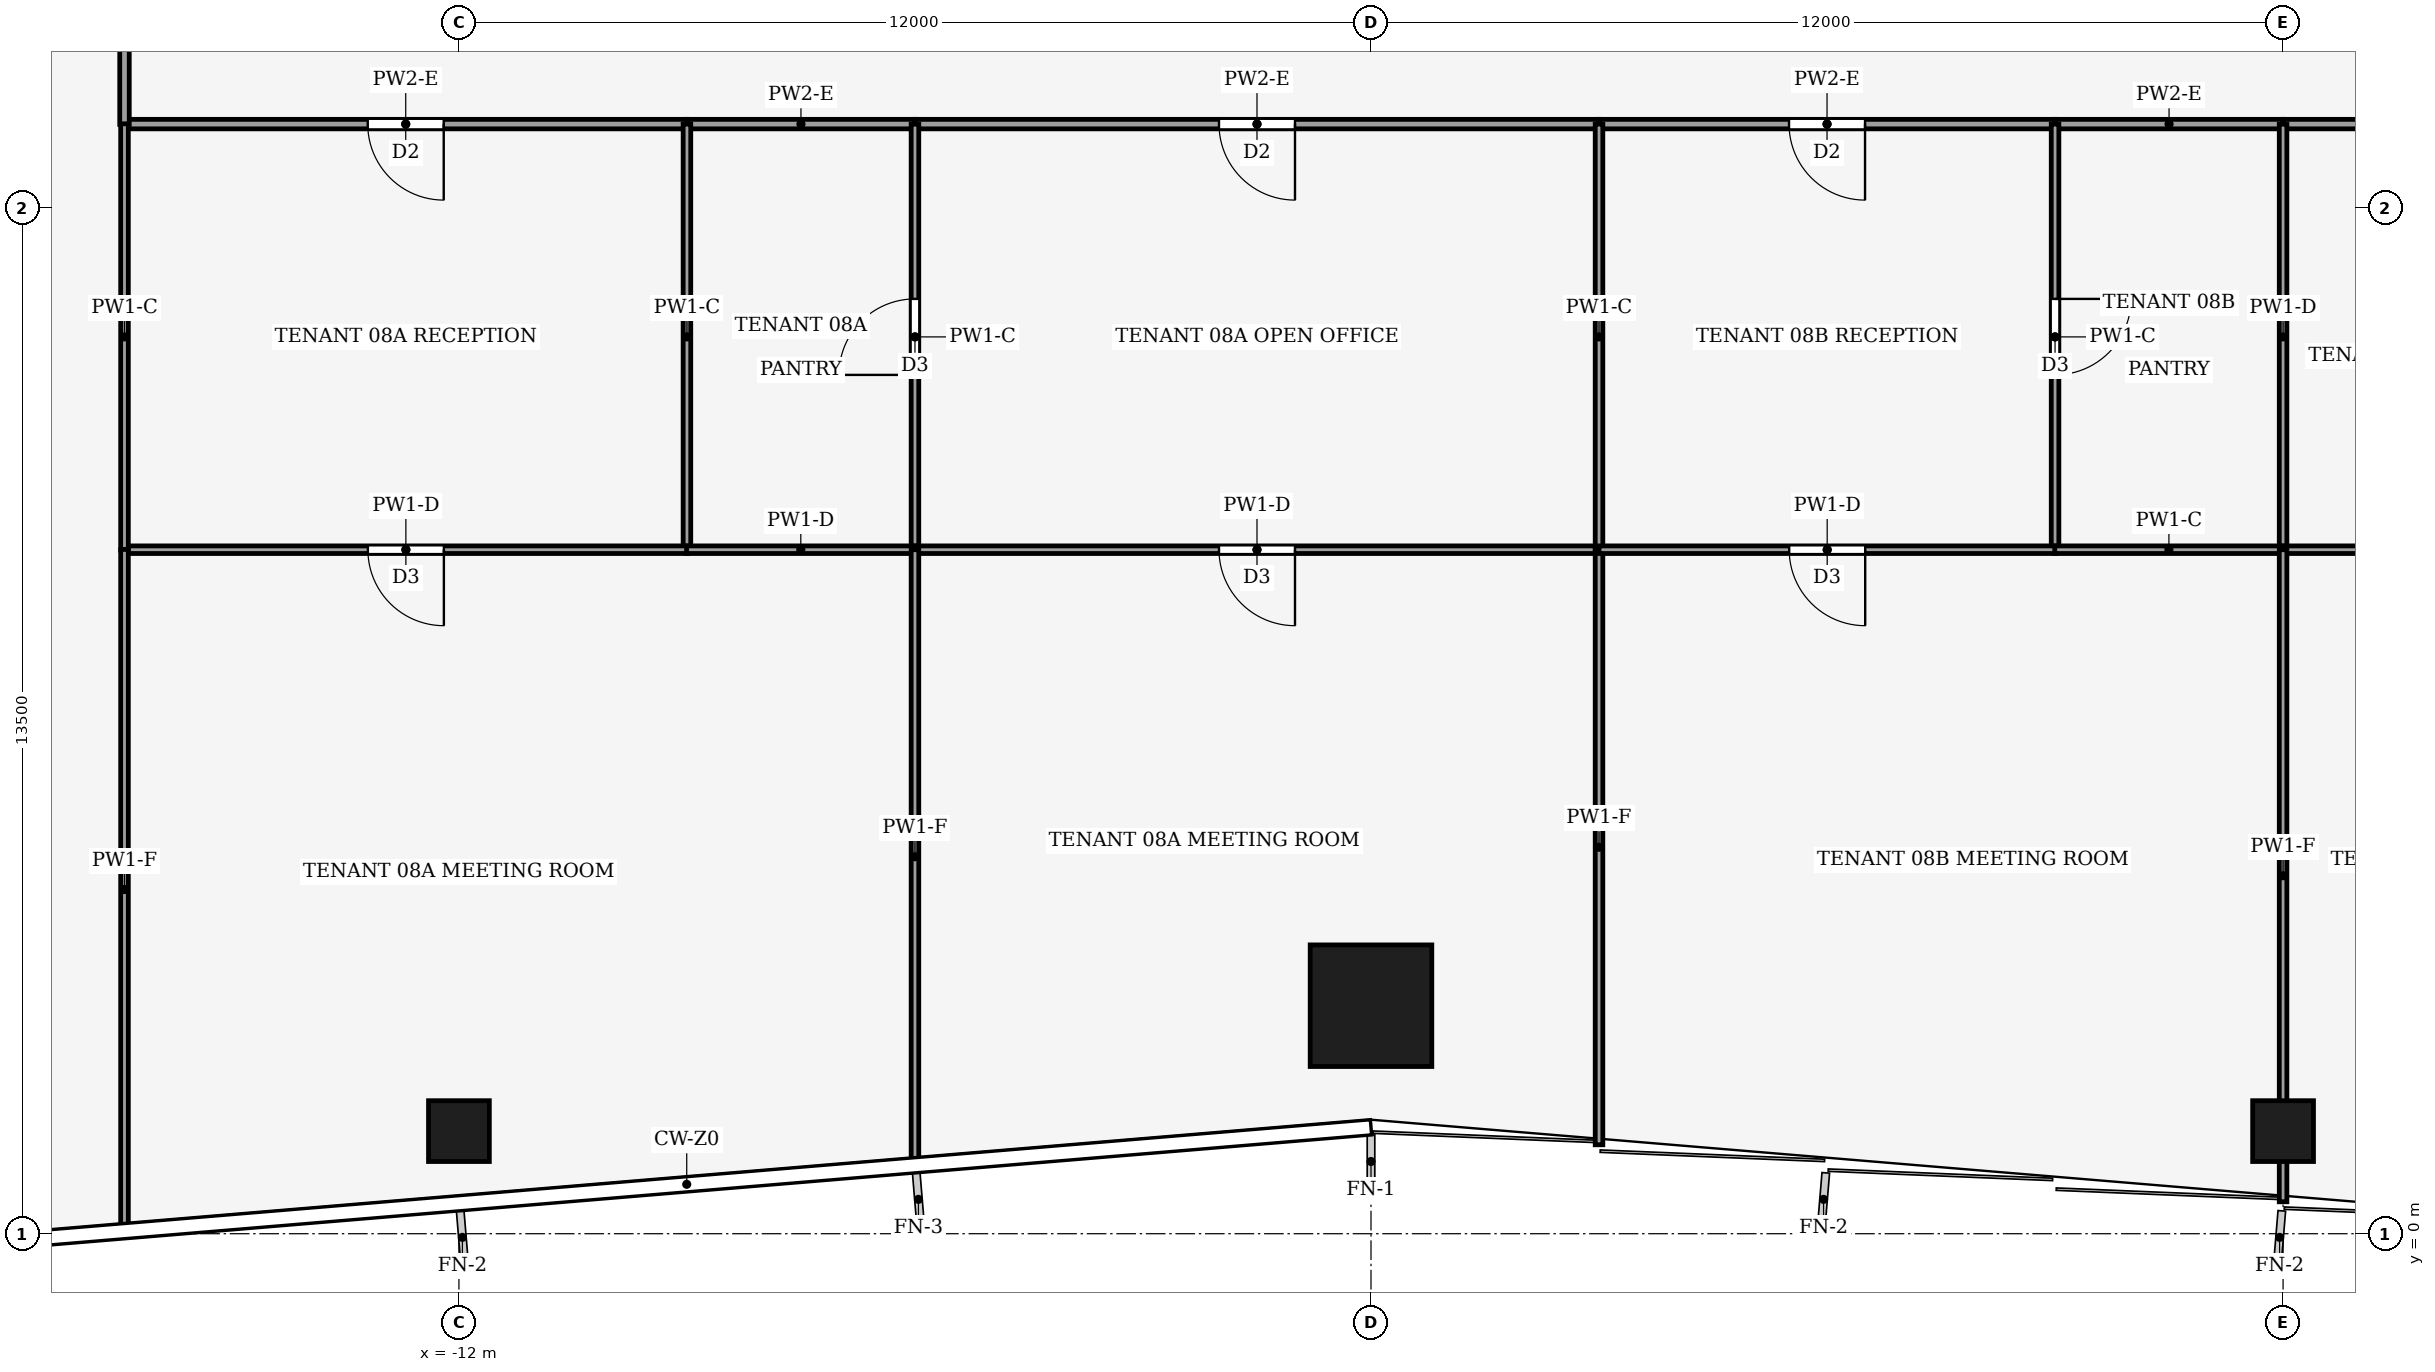
"""IFC4 building model, lengths in metres.
Left out: names, types, materials, properties, quantities, classifications, styles, units other than length and angle.
Written with IfcOpenShell. Run it as: python <this file> out.ifc"""

import sys

from ifc_helpers import new_model, si_unit, direction, frame, frame_2d, origin, origin_2d, place, context, subcontext, project, spatial, rectangle, hollow_rectangle, extrude, element, fill, save


model = new_model("IFC4")
c1 = context("Model", 3, precision=1e-05, world=origin(), true_north=direction((0.0, 1.0)))
c2 = subcontext(c1, "Body", "Model", "MODEL_VIEW")
j1 = project(units=[si_unit("LENGTHUNIT", "METRE"), si_unit("PLANEANGLEUNIT", "RADIAN")], contexts=[c1])
p1 = place(None, origin())
s1 = spatial("IfcSite", under=j1, at=p1, CompositionType="ELEMENT")
p2 = place(p1, origin())
s2 = spatial("IfcBuilding", under=s1, at=p2, CompositionType="ELEMENT")
p3 = place(p2, frame((0.0, 0.0, 38.0)))
s3 = spatial("IfcBuildingStorey", under=s2, at=p3, CompositionType="ELEMENT", Elevation=38.0)
p4 = place(p3, frame((0.0, 3.0, 0.0), z_axis=(0.0, 0.0, 1.0), x_axis=(1.0, 0.0, 0.0)))
e1 = element("IfcColumn", 1, at=p4, inside=s3, PredefinedType="COLUMN", context=c2, shape_type="SweptSolid", body=[
    extrude(hollow_rectangle(XDim=1.6, YDim=1.6, WallThickness=0.09, at=origin_2d()), origin(), (0.0, 0.0, 1.0), 4.0),
])
for number, where, z_axis, x_axis in (
    (2, (-12.0, 1.35, 0.0), (0.0, 0.0, 1.0), (1.0, 0.0, 0.0)),
    (3, (12.0, 1.35, 0.0), (0.0, 0.0, 1.0), (1.0, 0.0, 0.0)),
):
    element("IfcColumn", number, at=place(p3, frame(where, z_axis=z_axis, x_axis=x_axis)), inside=s3, PredefinedType="COLUMN", context=c2, shape_type="SweptSolid", body=[
        extrude(hollow_rectangle(XDim=0.8, YDim=0.8, WallThickness=0.04, at=origin_2d()), origin(), (0.0, 0.0, 1.0), 4.0),
    ])
p5 = place(p3, frame((-9.0, 14.6, 0.0), z_axis=(0.0, 0.0, 1.0), x_axis=(-1.0, 0.0, 0.0)))
e4 = element("IfcWall", 4, at=p5, inside=s3, PredefinedType="PARTITIONING", context=c2, shape_type="SweptSolid", body=[
    extrude(rectangle(XDim=7.4, YDim=0.125, at=frame_2d((3.7, 0.0))), origin(), (0.0, 0.0, 1.0), 3.29),
])
p6 = place(p5, frame((3.2, 0.0, 0.0)))
e5 = element("IfcOpeningElement", 5, at=p6, cuts=e4, PredefinedType="OPENING", context=c2, shape_type="SweptSolid", body=[
    extrude(rectangle(XDim=1.0, YDim=2.1, at=frame_2d((0.5, 1.05))), frame((0.0, 0.073, 0.0), z_axis=(0.0, -1.0, 0.0), x_axis=(1.0, 0.0, 0.0)), (0.0, 0.0, 1.0), 0.145),
])
p7 = place(p3, frame((-9.0, 14.6, 0.0), z_axis=(0.0, 0.0, 1.0), x_axis=(1.0, 0.0, 0.0)))
e6 = element("IfcWall", 6, at=p7, inside=s3, PredefinedType="PARTITIONING", context=c2, shape_type="SweptSolid", body=[
    extrude(rectangle(XDim=3.0, YDim=0.125, at=frame_2d((1.5, 0.0))), origin(), (0.0, 0.0, 1.0), 3.29),
])
p8 = place(p3, frame((3.0, 14.6, 0.0), z_axis=(0.0, 0.0, 1.0), x_axis=(-1.0, 0.0, 0.0)))
e7 = element("IfcWall", 7, at=p8, inside=s3, PredefinedType="PARTITIONING", context=c2, shape_type="SweptSolid", body=[
    extrude(rectangle(XDim=9.0, YDim=0.125, at=frame_2d((4.5, 0.0))), origin(), (0.0, 0.0, 1.0), 3.29),
])
p9 = place(p8, frame((4.0, 0.0, 0.0)))
e8 = element("IfcOpeningElement", 8, at=p9, cuts=e7, PredefinedType="OPENING", context=c2, shape_type="SweptSolid", body=[
    extrude(rectangle(XDim=1.0, YDim=2.1, at=frame_2d((0.5, 1.05))), frame((0.0, 0.073, 0.0), z_axis=(0.0, -1.0, 0.0), x_axis=(1.0, 0.0, 0.0)), (0.0, 0.0, 1.0), 0.145),
])
p10 = place(p3, frame((9.0, 14.6, 0.0), z_axis=(0.0, 0.0, 1.0), x_axis=(-1.0, 0.0, 0.0)))
e9 = element("IfcWall", 9, at=p10, inside=s3, PredefinedType="PARTITIONING", context=c2, shape_type="SweptSolid", body=[
    extrude(rectangle(XDim=6.0, YDim=0.125, at=frame_2d((3.0, 0.0))), origin(), (0.0, 0.0, 1.0), 3.29),
])
p11 = place(p10, frame((2.5, 0.0, 0.0)))
e10 = element("IfcOpeningElement", 10, at=p11, cuts=e9, PredefinedType="OPENING", context=c2, shape_type="SweptSolid", body=[
    extrude(rectangle(XDim=1.0, YDim=2.1, at=frame_2d((0.5, 1.05))), frame((0.0, 0.073, 0.0), z_axis=(0.0, -1.0, 0.0), x_axis=(1.0, 0.0, 0.0)), (0.0, 0.0, 1.0), 0.145),
])
p12 = place(p3, frame((9.0, 14.6, 0.0), z_axis=(0.0, 0.0, 1.0), x_axis=(1.0, 0.0, 0.0)))
e11 = element("IfcWall", 11, at=p12, inside=s3, PredefinedType="PARTITIONING", context=c2, shape_type="SweptSolid", body=[
    extrude(rectangle(XDim=3.0, YDim=0.125, at=frame_2d((1.5, 0.0))), origin(), (0.0, 0.0, 1.0), 3.29),
])
p13 = place(p3, frame((16.4, 14.6, 0.0), z_axis=(0.0, 0.0, 1.0), x_axis=(-1.0, 0.0, 0.0)))
e12 = element("IfcWall", 12, at=p13, inside=s3, PredefinedType="PARTITIONING", context=c2, shape_type="SweptSolid", body=[
    extrude(rectangle(XDim=4.4, YDim=0.125, at=frame_2d((2.2, 0.0))), origin(), (0.0, 0.0, 1.0), 3.29),
])
p14 = place(p13, frame((1.7, 0.0, 0.0)))
e13 = element("IfcOpeningElement", 13, at=p14, cuts=e12, PredefinedType="OPENING", context=c2, shape_type="SweptSolid", body=[
    extrude(rectangle(XDim=1.0, YDim=2.1, at=frame_2d((0.5, 1.05))), frame((0.0, 0.073, 0.0), z_axis=(0.0, -1.0, 0.0), x_axis=(1.0, 0.0, 0.0)), (0.0, 0.0, 1.0), 0.145),
])
p15 = place(p3, frame((-16.4, 14.596, 0.0), z_axis=(0.0, 0.0, 1.0), x_axis=(0.0, 1.0, 0.0)))
e14 = element("IfcWall", 14, at=p15, inside=s3, PredefinedType="PARTITIONING", context=c2, shape_type="SweptSolid", body=[
    extrude(rectangle(XDim=9.404, YDim=0.125, at=frame_2d((4.702, 0.0))), origin(), (0.0, 0.0, 1.0), 3.14),
])
p16 = place(p15, frame((4.202, 0.0, 0.0)))
e15 = element("IfcOpeningElement", 15, at=p16, cuts=e14, PredefinedType="OPENING", context=c2, shape_type="SweptSolid", body=[
    extrude(rectangle(XDim=1.0, YDim=2.1, at=frame_2d((0.5, 1.05))), frame((0.0, 0.073, 0.0), z_axis=(0.0, -1.0, 0.0), x_axis=(1.0, 0.0, 0.0)), (0.0, 0.0, 1.0), 0.145),
])
p17 = place(p3, frame((-9.0, 9.0, 0.0), z_axis=(0.0, 0.0, 1.0), x_axis=(0.0, 1.0, 0.0)))
e16 = element("IfcWall", 16, at=p17, inside=s3, PredefinedType="PARTITIONING", context=c2, shape_type="SweptSolid", body=[
    extrude(rectangle(XDim=5.6, YDim=0.1, at=frame_2d((2.8, 0.0))), origin(), (0.0, 0.0, 1.0), 3.87),
])
p18 = place(p3, frame((-8.996, 9.0, 0.0), z_axis=(0.0, 0.0, 1.0), x_axis=(-1.0, 0.0, 0.0)))
e17 = element("IfcWall", 17, at=p18, inside=s3, PredefinedType="PARTITIONING", context=c2, shape_type="SweptSolid", body=[
    extrude(rectangle(XDim=7.404, YDim=0.1, at=frame_2d((3.702, 0.0))), origin(), (0.0, 0.0, 1.0), 3.29),
])
p19 = place(p18, frame((3.202, 0.0, 0.0)))
e18 = element("IfcOpeningElement", 18, at=p19, cuts=e17, PredefinedType="OPENING", context=c2, shape_type="SweptSolid", body=[
    extrude(rectangle(XDim=1.0, YDim=2.1, at=frame_2d((0.5, 1.05))), frame((0.0, 0.06, 0.0), z_axis=(0.0, -1.0, 0.0), x_axis=(1.0, 0.0, 0.0)), (0.0, 0.0, 1.0), 0.12),
])
p20 = place(p3, frame((-16.4, 14.604, 0.0), z_axis=(0.0, 0.0, 1.0), x_axis=(0.0, -1.0, 0.0)))
e19 = element("IfcWall", 19, at=p20, inside=s3, PredefinedType="PARTITIONING", context=c2, shape_type="SweptSolid", body=[
    extrude(rectangle(XDim=5.608, YDim=0.1, at=frame_2d((2.804, 0.0))), origin(), (0.0, 0.0, 1.0), 3.87),
])
p21 = place(p3, frame((-6.0, 9.0, 0.0), z_axis=(0.0, 0.0, 1.0), x_axis=(0.0, 1.0, 0.0)))
e20 = element("IfcWall", 20, at=p21, inside=s3, PredefinedType="PARTITIONING", context=c2, shape_type="SweptSolid", body=[
    extrude(rectangle(XDim=5.6, YDim=0.1, at=frame_2d((2.8, 0.0))), origin(), (0.0, 0.0, 1.0), 3.87),
])
p22 = place(p21, frame((2.3, 0.0, 0.0)))
e21 = element("IfcOpeningElement", 21, at=p22, cuts=e20, PredefinedType="OPENING", context=c2, shape_type="SweptSolid", body=[
    extrude(rectangle(XDim=1.0, YDim=2.1, at=frame_2d((0.5, 1.05))), frame((0.0, 0.06, 0.0), z_axis=(0.0, -1.0, 0.0), x_axis=(1.0, 0.0, 0.0)), (0.0, 0.0, 1.0), 0.12),
])
p23 = place(p3, frame((-9.004, 9.0, 0.0), z_axis=(0.0, 0.0, 1.0), x_axis=(1.0, 0.0, 0.0)))
e22 = element("IfcWall", 22, at=p23, inside=s3, PredefinedType="PARTITIONING", context=c2, shape_type="SweptSolid", body=[
    extrude(rectangle(XDim=3.004, YDim=0.1, at=frame_2d((1.502, 0.0))), origin(), (0.0, 0.0, 1.0), 3.29),
])
p24 = place(p3, frame((3.0, 9.0, 0.0), z_axis=(0.0, 0.0, 1.0), x_axis=(-1.0, 0.0, 0.0)))
e23 = element("IfcWall", 23, at=p24, inside=s3, PredefinedType="PARTITIONING", context=c2, shape_type="SweptSolid", body=[
    extrude(rectangle(XDim=9.0, YDim=0.1, at=frame_2d((4.5, 0.0))), origin(), (0.0, 0.0, 1.0), 3.29),
])
p25 = place(p24, frame((4.0, 0.0, 0.0)))
e24 = element("IfcOpeningElement", 24, at=p25, cuts=e23, PredefinedType="OPENING", context=c2, shape_type="SweptSolid", body=[
    extrude(rectangle(XDim=1.0, YDim=2.1, at=frame_2d((0.5, 1.05))), frame((0.0, 0.06, 0.0), z_axis=(0.0, -1.0, 0.0), x_axis=(1.0, 0.0, 0.0)), (0.0, 0.0, 1.0), 0.12),
])
p26 = place(p3, frame((3.0, 9.0, 0.0), z_axis=(0.0, 0.0, 1.0), x_axis=(0.0, 1.0, 0.0)))
e25 = element("IfcWall", 25, at=p26, inside=s3, PredefinedType="PARTITIONING", context=c2, shape_type="SweptSolid", body=[
    extrude(rectangle(XDim=5.6, YDim=0.1, at=frame_2d((2.8, 0.0))), origin(), (0.0, 0.0, 1.0), 3.87),
])
p27 = place(p3, frame((-6.0, 0.92, 0.0), z_axis=(0.0, 0.0, 1.0), x_axis=(0.0, 1.0, 0.0)))
e26 = element("IfcWall", 26, at=p27, inside=s3, PredefinedType="PARTITIONING", context=c2, shape_type="SweptSolid", body=[
    extrude(rectangle(XDim=8.08, YDim=0.1, at=frame_2d((4.04, 0.0))), origin(), (0.0, 0.0, 1.0), 3.04),
])
p28 = place(p3, frame((-16.4, 9.004, 0.0), z_axis=(0.0, 0.0, 1.0), x_axis=(0.0, -1.0, 0.0)))
e27 = element("IfcWall", 27, at=p28, inside=s3, PredefinedType="PARTITIONING", context=c2, shape_type="SweptSolid", body=[
    extrude(rectangle(XDim=8.951, YDim=0.1, at=frame_2d((4.475, 0.0))), origin(), (0.0, 0.0, 1.0), 3.04),
])
p29 = place(p3, frame((3.0, 1.17, 0.0), z_axis=(0.0, 0.0, 1.0), x_axis=(0.0, 1.0, 0.0)))
e28 = element("IfcWall", 28, at=p29, inside=s3, PredefinedType="PARTITIONING", context=c2, shape_type="SweptSolid", body=[
    extrude(rectangle(XDim=7.83, YDim=0.1, at=frame_2d((3.915, 0.0))), origin(), (0.0, 0.0, 1.0), 3.04),
])
p30 = place(p3, frame((9.0, 14.6, 0.0), z_axis=(0.0, 0.0, 1.0), x_axis=(0.0, -1.0, 0.0)))
e29 = element("IfcWall", 29, at=p30, inside=s3, PredefinedType="PARTITIONING", context=c2, shape_type="SweptSolid", body=[
    extrude(rectangle(XDim=5.6, YDim=0.1, at=frame_2d((2.8, 0.0))), origin(), (0.0, 0.0, 1.0), 3.87),
])
p31 = place(p30, frame((2.3, 0.0, 0.0)))
e30 = element("IfcOpeningElement", 30, at=p31, cuts=e29, PredefinedType="OPENING", context=c2, shape_type="SweptSolid", body=[
    extrude(rectangle(XDim=1.0, YDim=2.1, at=frame_2d((0.5, 1.05))), frame((0.0, 0.06, 0.0), z_axis=(0.0, -1.0, 0.0), x_axis=(1.0, 0.0, 0.0)), (0.0, 0.0, 1.0), 0.12),
])
p32 = place(p3, frame((9.004, 9.0, 0.0), z_axis=(0.0, 0.0, 1.0), x_axis=(-1.0, 0.0, 0.0)))
e31 = element("IfcWall", 31, at=p32, inside=s3, PredefinedType="PARTITIONING", context=c2, shape_type="SweptSolid", body=[
    extrude(rectangle(XDim=6.004, YDim=0.1, at=frame_2d((3.002, 0.0))), origin(), (0.0, 0.0, 1.0), 3.29),
])
p33 = place(p32, frame((2.502, 0.0, 0.0)))
e32 = element("IfcOpeningElement", 32, at=p33, cuts=e31, PredefinedType="OPENING", context=c2, shape_type="SweptSolid", body=[
    extrude(rectangle(XDim=1.0, YDim=2.1, at=frame_2d((0.5, 1.05))), frame((0.0, 0.06, 0.0), z_axis=(0.0, -1.0, 0.0), x_axis=(1.0, 0.0, 0.0)), (0.0, 0.0, 1.0), 0.12),
])
p34 = place(p3, frame((12.0, 9.0, 0.0), z_axis=(0.0, 0.0, 1.0), x_axis=(0.0, 1.0, 0.0)))
e33 = element("IfcWall", 33, at=p34, inside=s3, PredefinedType="PARTITIONING", context=c2, shape_type="SweptSolid", body=[
    extrude(rectangle(XDim=5.6, YDim=0.1, at=frame_2d((2.8, 0.0))), origin(), (0.0, 0.0, 1.0), 3.29),
])
p35 = place(p3, frame((8.996, 9.0, 0.0), z_axis=(0.0, 0.0, 1.0), x_axis=(1.0, 0.0, 0.0)))
e34 = element("IfcWall", 34, at=p35, inside=s3, PredefinedType="PARTITIONING", context=c2, shape_type="SweptSolid", body=[
    extrude(rectangle(XDim=3.004, YDim=0.1, at=frame_2d((1.502, 0.0))), origin(), (0.0, 0.0, 1.0), 3.87),
])
p36 = place(p3, frame((16.4, 9.0, 0.0), z_axis=(0.0, 0.0, 1.0), x_axis=(-1.0, 0.0, 0.0)))
e35 = element("IfcWall", 35, at=p36, inside=s3, PredefinedType="PARTITIONING", context=c2, shape_type="SweptSolid", body=[
    extrude(rectangle(XDim=4.4, YDim=0.1, at=frame_2d((2.2, 0.0))), origin(), (0.0, 0.0, 1.0), 3.29),
])
p37 = place(p36, frame((1.7, 0.0, 0.0)))
e36 = element("IfcOpeningElement", 36, at=p37, cuts=e35, PredefinedType="OPENING", context=c2, shape_type="SweptSolid", body=[
    extrude(rectangle(XDim=1.0, YDim=2.1, at=frame_2d((0.5, 1.05))), frame((0.0, 0.06, 0.0), z_axis=(0.0, -1.0, 0.0), x_axis=(1.0, 0.0, 0.0)), (0.0, 0.0, 1.0), 0.12),
])
p38 = place(p3, frame((12.0, 0.42, 0.0), z_axis=(0.0, 0.0, 1.0), x_axis=(0.0, 1.0, 0.0)))
e37 = element("IfcWall", 37, at=p38, inside=s3, PredefinedType="PARTITIONING", context=c2, shape_type="SweptSolid", body=[
    extrude(rectangle(XDim=8.58, YDim=0.1, at=frame_2d((4.29, 0.0))), origin(), (0.0, 0.0, 1.0), 3.04),
])
p39 = place(p6, origin())
e38 = element("IfcDoor", 38, at=p39, inside=s3, OperationType="SINGLE_SWING_LEFT", PredefinedType="DOOR", context=c2, shape_type="SweptSolid", body=[
    extrude(rectangle(XDim=1.0, YDim=2.1, at=frame_2d((0.5, 1.05))), frame((0.0, 0.025, 0.0), z_axis=(0.0, -1.0, 0.0), x_axis=(1.0, 0.0, 0.0)), (0.0, 0.0, 1.0), 0.05),
])
fill(e5, e38)
p40 = place(p9, origin())
e39 = element("IfcDoor", 39, at=p40, inside=s3, OperationType="SINGLE_SWING_RIGHT", PredefinedType="DOOR", context=c2, shape_type="SweptSolid", body=[
    extrude(rectangle(XDim=1.0, YDim=2.1, at=frame_2d((0.5, 1.05))), frame((0.0, 0.025, 0.0), z_axis=(0.0, -1.0, 0.0), x_axis=(1.0, 0.0, 0.0)), (0.0, 0.0, 1.0), 0.05),
])
fill(e8, e39)
p41 = place(p11, origin())
e40 = element("IfcDoor", 40, at=p41, inside=s3, OperationType="SINGLE_SWING_LEFT", PredefinedType="DOOR", context=c2, shape_type="SweptSolid", body=[
    extrude(rectangle(XDim=1.0, YDim=2.1, at=frame_2d((0.5, 1.05))), frame((0.0, 0.025, 0.0), z_axis=(0.0, -1.0, 0.0), x_axis=(1.0, 0.0, 0.0)), (0.0, 0.0, 1.0), 0.05),
])
fill(e10, e40)
p42 = place(p19, origin())
e41 = element("IfcDoor", 41, at=p42, inside=s3, OperationType="SINGLE_SWING_LEFT", PredefinedType="DOOR", context=c2, shape_type="SweptSolid", body=[
    extrude(rectangle(XDim=1.0, YDim=2.1, at=frame_2d((0.5, 1.05))), frame((0.0, 0.025, 0.0), z_axis=(0.0, -1.0, 0.0), x_axis=(1.0, 0.0, 0.0)), (0.0, 0.0, 1.0), 0.05),
])
fill(e18, e41)
p43 = place(p22, origin())
e42 = element("IfcDoor", 42, at=p43, inside=s3, OperationType="SINGLE_SWING_RIGHT", PredefinedType="DOOR", context=c2, shape_type="SweptSolid", body=[
    extrude(rectangle(XDim=1.0, YDim=2.1, at=frame_2d((0.5, 1.05))), frame((0.0, 0.025, 0.0), z_axis=(0.0, -1.0, 0.0), x_axis=(1.0, 0.0, 0.0)), (0.0, 0.0, 1.0), 0.05),
])
fill(e21, e42)
p44 = place(p25, origin())
e43 = element("IfcDoor", 43, at=p44, inside=s3, OperationType="SINGLE_SWING_LEFT", PredefinedType="DOOR", context=c2, shape_type="SweptSolid", body=[
    extrude(rectangle(XDim=1.0, YDim=2.1, at=frame_2d((0.5, 1.05))), frame((0.0, 0.025, 0.0), z_axis=(0.0, -1.0, 0.0), x_axis=(1.0, 0.0, 0.0)), (0.0, 0.0, 1.0), 0.05),
])
fill(e24, e43)
p45 = place(p31, origin())
e44 = element("IfcDoor", 44, at=p45, inside=s3, OperationType="SINGLE_SWING_RIGHT", PredefinedType="DOOR", context=c2, shape_type="SweptSolid", body=[
    extrude(rectangle(XDim=1.0, YDim=2.1, at=frame_2d((0.5, 1.05))), frame((0.0, 0.025, 0.0), z_axis=(0.0, -1.0, 0.0), x_axis=(1.0, 0.0, 0.0)), (0.0, 0.0, 1.0), 0.05),
])
fill(e30, e44)
p46 = place(p33, origin())
e45 = element("IfcDoor", 45, at=p46, inside=s3, OperationType="SINGLE_SWING_LEFT", PredefinedType="DOOR", context=c2, shape_type="SweptSolid", body=[
    extrude(rectangle(XDim=1.0, YDim=2.1, at=frame_2d((0.5, 1.05))), frame((0.0, 0.025, 0.0), z_axis=(0.0, -1.0, 0.0), x_axis=(1.0, 0.0, 0.0)), (0.0, 0.0, 1.0), 0.05),
])
fill(e32, e45)
save(model, sys.argv[1])
